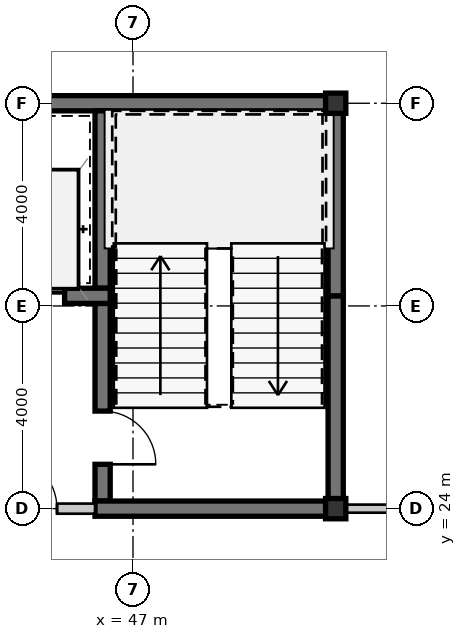
"""IFC4 building model, lengths in metres.
Left out: names, types, materials, properties, quantities, classifications, styles, units other than length and angle.
Written with IfcOpenShell. Run it as: python <this file> out.ifc"""

import sys

from ifc_helpers import new_model, si_unit, direction, frame, frame_2d, origin, origin_2d, place, context, subcontext, project, spatial, rectangle, hollow_rectangle, extrude, source, transform, mapped, element, fill, save


model = new_model("IFC4")
c1 = context("Model", 3, precision=1e-05, world=origin(), true_north=direction((0.0, 1.0)))
c2 = subcontext(c1, "Body", "Model", "MODEL_VIEW")
j1 = project(units=[si_unit("LENGTHUNIT", "METRE"), si_unit("PLANEANGLEUNIT", "RADIAN")], contexts=[c1])
p1 = place(None, origin())
s1 = spatial("IfcSite", under=j1, at=p1, CompositionType="ELEMENT")
p2 = place(p1, origin())
s2 = spatial("IfcBuilding", under=s1, at=p2, CompositionType="ELEMENT")
p3 = place(p2, frame((0.0, 0.0, 151.9)))
s3 = spatial("IfcBuildingStorey", under=s2, at=p3, CompositionType="ELEMENT", Elevation=151.9)
m1 = source(origin(), c2, "Body", "SweptSolid", [
    extrude(hollow_rectangle(XDim=0.4, YDim=0.4, WallThickness=0.016, at=origin_2d()), origin(), (0.0, 0.0, 1.0), 3.15),
])
for number, where, z_axis, x_axis in (
    (1, (51.0, 24.0, 0.0), (0.0, 0.0, 1.0), (1.0, 0.0, 0.0)),
    (2, (51.0, 32.0, 0.0), (0.0, 0.0, 1.0), (1.0, 0.0, 0.0)),
):
    element("IfcColumn", number, at=place(p3, frame(where, z_axis=z_axis, x_axis=x_axis)), inside=s3, PredefinedType="COLUMN", context=c2, shape_type="MappedRepresentation", body=[
        mapped(m1, transform((0.0, 0.0, 0.0), scale=1.0)),
    ])
m2 = source(origin(), c2, "Body", "SweptSolid", [
    extrude(rectangle(XDim=11.95, YDim=0.3, at=frame_2d((5.975, 0.0))), origin(), (0.0, 0.0, 1.0), 2.93),
])
p4 = place(p3, frame((39.2, 32.0, 0.0), z_axis=(0.0, 0.0, 1.0), x_axis=(1.0, 0.0, 0.0)))
e3 = element("IfcWall", 3, at=p4, inside=s3, PredefinedType="SHEAR", context=c2, shape_type="MappedRepresentation", body=[
    mapped(m2, transform((0.0, 0.0, 0.0), scale=1.0)),
])
m3 = source(origin(), c2, "Body", "SweptSolid", [
    extrude(rectangle(XDim=4.05, YDim=0.3, at=frame_2d((2.025, 0.0))), origin(), (0.0, 0.0, 1.0), 2.93),
])
p5 = place(p3, frame((51.0, 24.15, 0.0), z_axis=(0.0, 0.0, 1.0), x_axis=(0.0, 1.0, 0.0)))
e4 = element("IfcWall", 4, at=p5, inside=s3, PredefinedType="SHEAR", context=c2, shape_type="MappedRepresentation", body=[
    mapped(m3, transform((0.0, 0.0, 0.0), scale=1.0)),
])
m4 = source(origin(), c2, "Body", "SweptSolid", [
    extrude(rectangle(XDim=3.65, YDim=0.3, at=frame_2d((1.825, 0.0))), origin(), (0.0, 0.0, 1.0), 2.93),
])
p6 = place(p3, frame((51.0, 28.2, 0.0), z_axis=(0.0, 0.0, 1.0), x_axis=(0.0, 1.0, 0.0)))
e5 = element("IfcWall", 5, at=p6, inside=s3, PredefinedType="SHEAR", context=c2, shape_type="MappedRepresentation", body=[
    mapped(m4, transform((0.0, 0.0, 0.0), scale=1.0)),
])
m5 = source(origin(), c2, "Body", "SweptSolid", [
    extrude(rectangle(XDim=3.5, YDim=0.3, at=frame_2d((1.75, 0.0))), origin(), (0.0, 0.0, 1.0), 2.93),
])
p7 = place(p3, frame((46.4, 31.85, 0.0), z_axis=(0.0, 0.0, 1.0), x_axis=(0.0, -1.0, 0.0)))
e6 = element("IfcWall", 6, at=p7, inside=s3, PredefinedType="SHEAR", context=c2, shape_type="MappedRepresentation", body=[
    mapped(m5, transform((0.0, 0.0, 0.0), scale=1.0)),
])
m6 = source(origin(), c2, "Body", "SweptSolid", [
    extrude(rectangle(XDim=3.9, YDim=0.3, at=frame_2d((1.95, 0.0))), origin(), (0.0, 0.0, 1.0), 2.93),
])
p8 = place(p3, frame((46.4, 28.05, 0.0), z_axis=(0.0, 0.0, 1.0), x_axis=(0.0, -1.0, 0.0)))
e7 = element("IfcWall", 7, at=p8, inside=s3, PredefinedType="SHEAR", context=c2, shape_type="MappedRepresentation", body=[
    mapped(m6, transform((0.0, 0.0, 0.0), scale=1.0)),
])
m7 = source(origin(), c2, "Body", "SweptSolid", [
    extrude(rectangle(XDim=1.05, YDim=2.1, at=frame_2d((0.525, 1.05))), frame((0.0, 0.16, 0.0), z_axis=(0.0, -1.0, 0.0), x_axis=(1.0, 0.0, 0.0)), (0.0, 0.0, 1.0), 0.32),
])
p9 = place(p8, frame((2.125, 0.0, 0.0)))
e8 = element("IfcOpeningElement", 8, at=p9, cuts=e7, PredefinedType="OPENING", context=c2, shape_type="MappedRepresentation", body=[
    mapped(m7, transform((0.0, 0.0, 0.0), scale=1.0)),
])
m8 = source(origin(), c2, "Body", "SweptSolid", [
    extrude(rectangle(XDim=4.9, YDim=0.3, at=frame_2d((2.45, 0.0))), origin(), (0.0, 0.0, 1.0), 2.93),
])
p10 = place(p3, frame((46.25, 24.0, 0.0), z_axis=(0.0, 0.0, 1.0), x_axis=(1.0, 0.0, 0.0)))
e9 = element("IfcWall", 9, at=p10, inside=s3, PredefinedType="SHEAR", context=c2, shape_type="MappedRepresentation", body=[
    mapped(m8, transform((0.0, 0.0, 0.0), scale=1.0)),
])
m9 = source(origin(), c2, "Body", "SweptSolid", [
    extrude(rectangle(XDim=2.9, YDim=0.3, at=frame_2d((1.45, 0.0))), origin(), (0.0, 0.0, 1.0), 2.93),
])
p11 = place(p3, frame((43.65, 28.2, 0.0), z_axis=(0.0, 0.0, 1.0), x_axis=(1.0, 0.0, 0.0)))
e10 = element("IfcWall", 10, at=p11, inside=s3, PredefinedType="SHEAR", context=c2, shape_type="MappedRepresentation", body=[
    mapped(m9, transform((0.0, 0.0, 0.0), scale=1.0)),
])
m10 = source(origin(), c2, "Body", "SweptSolid", [
    extrude(rectangle(XDim=1.1, YDim=2.15, at=frame_2d((0.55, 1.075))), frame((0.0, 0.16, 0.0), z_axis=(0.0, -1.0, 0.0), x_axis=(1.0, 0.0, 0.0)), (0.0, 0.0, 1.0), 0.32),
])
p12 = place(p11, frame((0.9, 0.0, 0.0)))
e11 = element("IfcOpeningElement", 11, at=p12, cuts=e10, PredefinedType="OPENING", context=c2, shape_type="MappedRepresentation", body=[
    mapped(m10, transform((0.0, 0.0, 0.0), scale=1.0)),
])
m11 = source(origin(), c2, "Body", "SweptSolid", [
    extrude(rectangle(XDim=2.7, YDim=0.2, at=frame_2d((1.35, 0.0))), origin(), (0.0, 0.0, 1.0), 2.397),
])
p13 = place(p3, frame((43.55, 24.0, 0.0), z_axis=(0.0, 0.0, 1.0), x_axis=(1.0, 0.0, 0.0)))
e12 = element("IfcWall", 12, at=p13, inside=s3, PredefinedType="SOLIDWALL", context=c2, shape_type="MappedRepresentation", body=[
    mapped(m11, transform((0.0, 0.0, 0.0), scale=1.0)),
])
m12 = source(origin(), c2, "Body", "SweptSolid", [
    extrude(rectangle(XDim=1.05, YDim=2.1, at=frame_2d((0.525, 1.05))), frame((0.0, 0.11, 0.0), z_axis=(0.0, -1.0, 0.0), x_axis=(1.0, 0.0, 0.0)), (0.0, 0.0, 1.0), 0.22),
])
p14 = place(p13, frame((0.9, 0.0, 0.0)))
e13 = element("IfcOpeningElement", 13, at=p14, cuts=e12, PredefinedType="OPENING", context=c2, shape_type="MappedRepresentation", body=[
    mapped(m12, transform((0.0, 0.0, 0.0), scale=1.0)),
])
m13 = source(origin(), c2, "Body", "SweptSolid", [
    extrude(rectangle(XDim=10.1, YDim=0.16, at=frame_2d((5.05, 0.0))), origin(), (0.0, 0.0, 1.0), 2.93),
])
p15 = place(p3, frame((51.15, 24.0, 0.0), z_axis=(0.0, 0.0, 1.0), x_axis=(1.0, 0.0, 0.0)))
e14 = element("IfcWall", 14, at=p15, inside=s3, PredefinedType="PARTITIONING", context=c2, shape_type="MappedRepresentation", body=[
    mapped(m13, transform((0.0, 0.0, 0.0), scale=1.0)),
])
m14 = source(origin(), c2, "Body", "SweptSolid", [
    extrude(rectangle(XDim=0.92, YDim=2.1, at=frame_2d((0.46, 1.05))), frame((0.0, 0.09, 0.0), z_axis=(0.0, -1.0, 0.0), x_axis=(1.0, 0.0, 0.0)), (0.0, 0.0, 1.0), 0.18),
])
p16 = place(p15, frame((4.525, 0.0, 0.0)))
e15 = element("IfcOpeningElement", 15, at=p16, cuts=e14, PredefinedType="OPENING", context=c2, shape_type="MappedRepresentation", body=[
    mapped(m14, transform((0.0, 0.0, 0.0), scale=1.0)),
])
m15 = source(origin(), c2, "Body", "SweptSolid", [
    extrude(rectangle(XDim=1.05, YDim=2.1, at=frame_2d((0.525, 1.05))), frame((0.0, 0.025, 0.0), z_axis=(0.0, -1.0, 0.0), x_axis=(1.0, 0.0, 0.0)), (0.0, 0.0, 1.0), 0.05),
])
p17 = place(p9, origin())
e16 = element("IfcDoor", 16, at=p17, inside=s3, OperationType="SINGLE_SWING_RIGHT", PredefinedType="DOOR", context=c2, shape_type="MappedRepresentation", body=[
    mapped(m15, transform((0.0, 0.0, 0.0), scale=1.0)),
])
fill(e8, e16)
m16 = source(origin(), c2, "Body", "SweptSolid", [
    extrude(rectangle(XDim=1.1, YDim=2.15, at=frame_2d((0.55, 1.075))), frame((0.0, 0.025, 0.0), z_axis=(0.0, -1.0, 0.0), x_axis=(1.0, 0.0, 0.0)), (0.0, 0.0, 1.0), 0.05),
])
p18 = place(p12, origin())
e17 = element("IfcDoor", 17, at=p18, inside=s3, OperationType="SLIDING_TO_LEFT", PredefinedType="DOOR", context=c2, shape_type="MappedRepresentation", body=[
    mapped(m16, transform((0.0, 0.0, 0.0), scale=1.0)),
])
fill(e11, e17)
p19 = place(p14, origin())
e18 = element("IfcDoor", 18, at=p19, inside=s3, OperationType="SINGLE_SWING_LEFT", PredefinedType="DOOR", context=c2, shape_type="MappedRepresentation", body=[
    mapped(m15, transform((0.0, 0.0, 0.0), scale=1.0)),
])
fill(e13, e18)
save(model, sys.argv[1])
